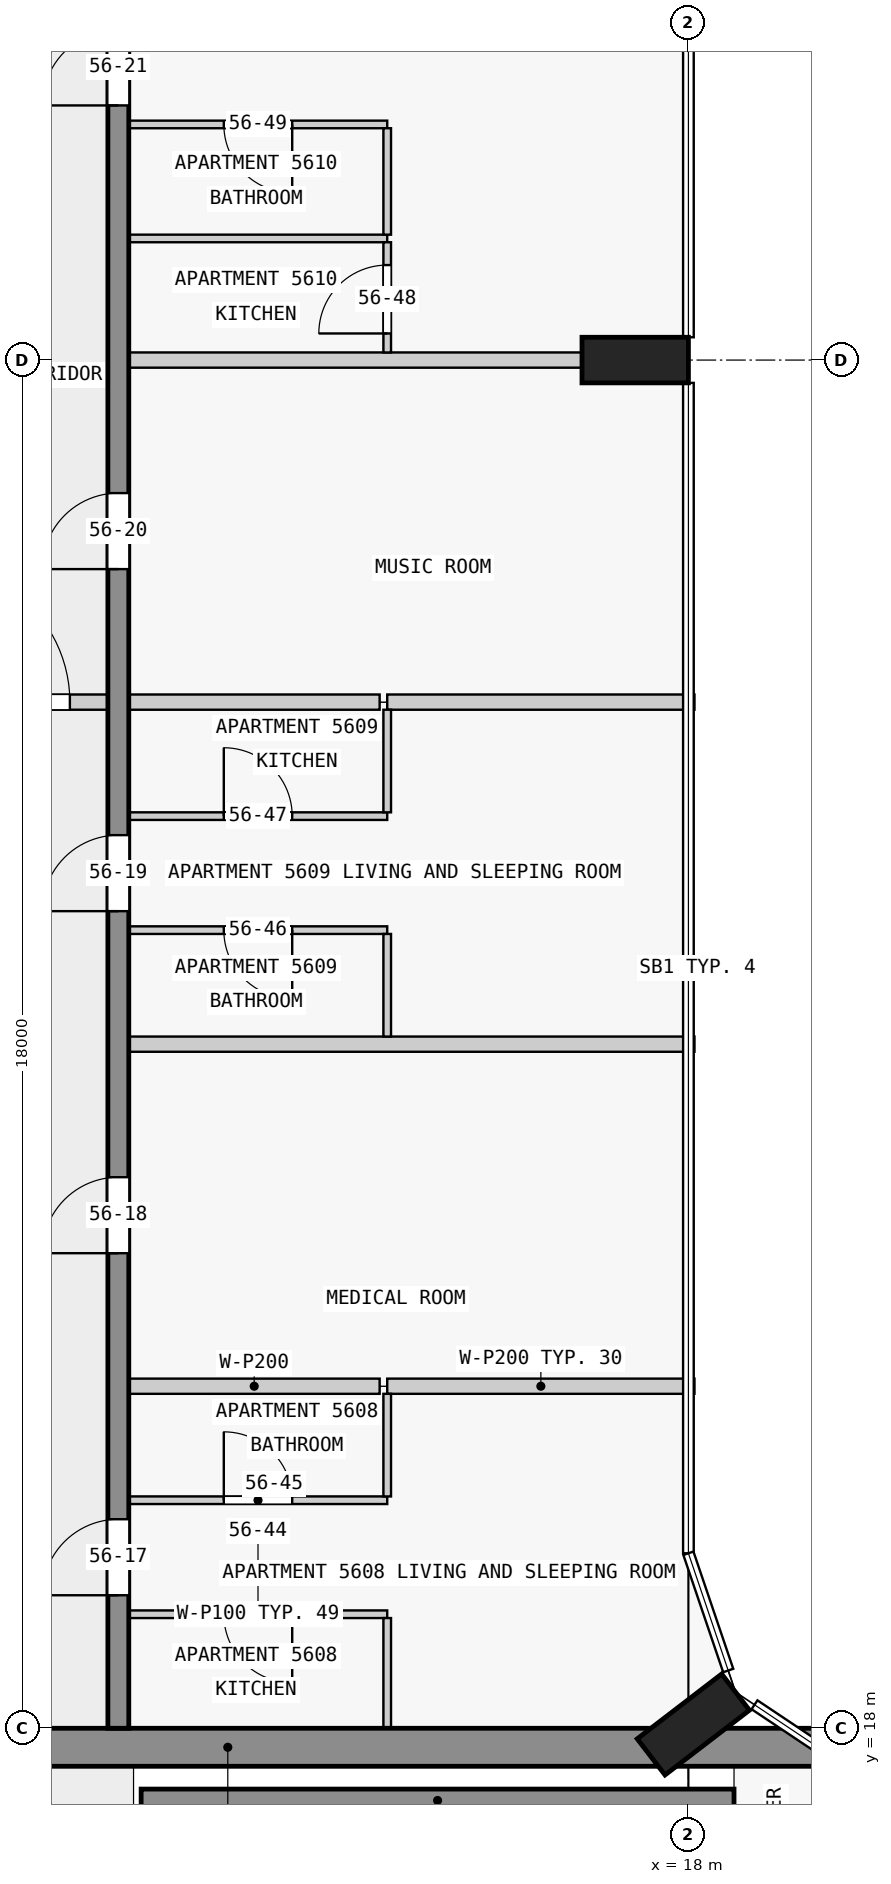
"""IFC4 building model, lengths in metres.
Left out: names, types, materials, properties, quantities, classifications, styles, units other than length and angle.
Written with IfcOpenShell. Run it as: python <this file> out.ifc"""

import sys

from ifc_helpers import new_model, si_unit, direction, frame, frame_2d, origin, origin_2d, place, context, subcontext, project, spatial, rectangle, extrude, element, fill, save


model = new_model("IFC4")
c1 = context("Model", 3, precision=1e-05, world=origin(), true_north=direction((0.0, 1.0)))
c2 = subcontext(c1, "Body", "Model", "MODEL_VIEW")
j1 = project(units=[si_unit("LENGTHUNIT", "METRE"), si_unit("PLANEANGLEUNIT", "RADIAN")], contexts=[c1])
p1 = place(None, origin())
s1 = spatial("IfcSite", under=j1, at=p1, CompositionType="ELEMENT")
p2 = place(p1, origin())
s2 = spatial("IfcBuilding", under=s1, at=p2, CompositionType="ELEMENT")
p3 = place(p2, frame((0.0, 0.0, 215.4)))
s3 = spatial("IfcBuildingStorey", under=s2, at=p3, CompositionType="ELEMENT", Elevation=215.4)
for number, where, z_axis, x_axis in (
    (1, (18.065, 18.05, 0.0), (0.0, 0.0, 1.0), (-0.609, 0.793, 0.0)),
    (2, (17.3, 36.0, 0.0), (0.0, 0.0, 1.0), (0.0, 1.0, 0.0)),
):
    element("IfcColumn", number, at=place(p3, frame(where, z_axis=z_axis, x_axis=x_axis)), inside=s3, PredefinedType="COLUMN", context=c2, shape_type="SweptSolid", body=[
        extrude(rectangle(XDim=0.6, YDim=1.4, at=origin_2d()), origin(), (0.0, 0.0, 1.0), 3.5),
    ])
p4 = place(p3, frame((1.38, 17.75, 0.0), z_axis=(0.0, 0.0, 1.0), x_axis=(1.0, 0.0, 0.0)))
e3 = element("IfcWall", 3, at=p4, inside=s3, PredefinedType="SHEAR", context=c2, shape_type="SweptSolid", body=[
    extrude(rectangle(XDim=21.12, YDim=0.5, at=frame_2d((10.56, 0.0))), origin(), (0.0, 0.0, 1.0), 3.25),
])
p5 = place(p4, frame((6.3, 0.0, 0.0)))
e4 = element("IfcOpeningElement", 4, at=p5, cuts=e3, PredefinedType="OPENING", context=c2, shape_type="SweptSolid", body=[
    extrude(rectangle(XDim=1.8, YDim=2.1, at=frame_2d((0.9, 1.05))), frame((0.0, 0.26, 0.0), z_axis=(0.0, -1.0, 0.0), x_axis=(1.0, 0.0, 0.0)), (0.0, 0.0, 1.0), 0.52),
])
p6 = place(p3, frame((10.8, 17.05, 0.0), z_axis=(0.0, 0.0, 1.0), x_axis=(1.0, 0.0, 0.0)))
e5 = element("IfcWall", 5, at=p6, inside=s3, PredefinedType="SHEAR", context=c2, shape_type="SweptSolid", body=[
    extrude(rectangle(XDim=7.8, YDim=0.3, at=frame_2d((3.9, 0.0))), origin(), (0.0, 0.0, 1.0), 3.25),
])
p7 = place(p3, frame((10.5, 18.0, 0.0), z_axis=(0.0, 0.0, 1.0), x_axis=(0.0, 1.0, 0.0)))
e6 = element("IfcWall", 6, at=p7, inside=s3, PredefinedType="SHEAR", context=c2, shape_type="SweptSolid", body=[
    extrude(rectangle(XDim=27.0, YDim=0.275, at=frame_2d((13.5, 0.0))), origin(), (0.0, 0.0, 1.0), 3.25),
])
p8 = place(p7, frame((1.75, 0.0, 0.0)))
e7 = element("IfcOpeningElement", 7, at=p8, cuts=e6, PredefinedType="OPENING", context=c2, shape_type="SweptSolid", body=[
    extrude(rectangle(XDim=1.0, YDim=2.1, at=frame_2d((0.5, 1.05))), frame((0.0, 0.147, 0.0), z_axis=(0.0, -1.0, 0.0), x_axis=(1.0, 0.0, 0.0)), (0.0, 0.0, 1.0), 0.295),
])
p9 = place(p7, frame((6.25, 0.0, 0.0)))
e8 = element("IfcOpeningElement", 8, at=p9, cuts=e6, PredefinedType="OPENING", context=c2, shape_type="SweptSolid", body=[
    extrude(rectangle(XDim=1.0, YDim=2.1, at=frame_2d((0.5, 1.05))), frame((0.0, 0.147, 0.0), z_axis=(0.0, -1.0, 0.0), x_axis=(1.0, 0.0, 0.0)), (0.0, 0.0, 1.0), 0.295),
])
p10 = place(p7, frame((10.75, 0.0, 0.0)))
e9 = element("IfcOpeningElement", 9, at=p10, cuts=e6, PredefinedType="OPENING", context=c2, shape_type="SweptSolid", body=[
    extrude(rectangle(XDim=1.0, YDim=2.1, at=frame_2d((0.5, 1.05))), frame((0.0, 0.147, 0.0), z_axis=(0.0, -1.0, 0.0), x_axis=(1.0, 0.0, 0.0)), (0.0, 0.0, 1.0), 0.295),
])
p11 = place(p7, frame((15.25, 0.0, 0.0)))
e10 = element("IfcOpeningElement", 10, at=p11, cuts=e6, PredefinedType="OPENING", context=c2, shape_type="SweptSolid", body=[
    extrude(rectangle(XDim=1.0, YDim=2.1, at=frame_2d((0.5, 1.05))), frame((0.0, 0.147, 0.0), z_axis=(0.0, -1.0, 0.0), x_axis=(1.0, 0.0, 0.0)), (0.0, 0.0, 1.0), 0.295),
])
p12 = place(p7, frame((21.35, 0.0, 0.0)))
e11 = element("IfcOpeningElement", 11, at=p12, cuts=e6, PredefinedType="OPENING", context=c2, shape_type="SweptSolid", body=[
    extrude(rectangle(XDim=1.0, YDim=2.1, at=frame_2d((0.5, 1.05))), frame((0.0, 0.147, 0.0), z_axis=(0.0, -1.0, 0.0), x_axis=(1.0, 0.0, 0.0)), (0.0, 0.0, 1.0), 0.295),
])
p13 = place(p3, frame((14.038, 19.5, 0.0), z_axis=(0.0, 0.0, 1.0), x_axis=(-1.0, 0.0, 0.0)))
e12 = element("IfcWall", 12, at=p13, inside=s3, PredefinedType="PARTITIONING", context=c2, shape_type="SweptSolid", body=[
    extrude(rectangle(XDim=3.4, YDim=0.1, at=frame_2d((1.7, 0.0))), origin(), (0.0, 0.0, 1.0), 3.25),
])
p14 = place(p13, frame((1.25, 0.0, 0.0)))
e13 = element("IfcOpeningElement", 13, at=p14, cuts=e12, PredefinedType="OPENING", context=c2, shape_type="SweptSolid", body=[
    extrude(rectangle(XDim=0.9, YDim=2.1, at=frame_2d((0.45, 1.05))), frame((0.0, 0.06, 0.0), z_axis=(0.0, -1.0, 0.0), x_axis=(1.0, 0.0, 0.0)), (0.0, 0.0, 1.0), 0.12),
])
p15 = place(p3, frame((10.637, 21.0, 0.0), z_axis=(0.0, 0.0, 1.0), x_axis=(1.0, 0.0, 0.0)))
e14 = element("IfcWall", 14, at=p15, inside=s3, PredefinedType="PARTITIONING", context=c2, shape_type="SweptSolid", body=[
    extrude(rectangle(XDim=3.4, YDim=0.1, at=frame_2d((1.7, 0.0))), origin(), (0.0, 0.0, 1.0), 3.25),
])
p16 = place(p15, frame((1.25, 0.0, 0.0)))
e15 = element("IfcOpeningElement", 15, at=p16, cuts=e14, PredefinedType="OPENING", context=c2, shape_type="SweptSolid", body=[
    extrude(rectangle(XDim=0.9, YDim=2.1, at=frame_2d((0.45, 1.05))), frame((0.0, 0.06, 0.0), z_axis=(0.0, -1.0, 0.0), x_axis=(1.0, 0.0, 0.0)), (0.0, 0.0, 1.0), 0.12),
])
p17 = place(p3, frame((13.938, 22.5, 0.0), z_axis=(0.0, 0.0, 1.0), x_axis=(-1.0, 0.0, 0.0)))
e16 = element("IfcWall", 16, at=p17, inside=s3, PredefinedType="PARTITIONING", context=c2, shape_type="SweptSolid", body=[
    extrude(rectangle(XDim=3.3, YDim=0.2, at=frame_2d((1.65, 0.0))), origin(), (0.0, 0.0, 1.0), 3.25),
])
p18 = place(p3, frame((14.038, 22.5, 0.0), z_axis=(0.0, 0.0, 1.0), x_axis=(1.0, 0.0, 0.0)))
e17 = element("IfcWall", 17, at=p18, inside=s3, PredefinedType="PARTITIONING", context=c2, shape_type="SweptSolid", body=[
    extrude(rectangle(XDim=4.042, YDim=0.2, at=frame_2d((2.021, 0.0))), origin(), (0.0, 0.0, 1.0), 3.25),
])
p19 = place(p3, frame((18.08, 27.0, 0.0), z_axis=(0.0, 0.0, 1.0), x_axis=(-1.0, 0.0, 0.0)))
e18 = element("IfcWall", 18, at=p19, inside=s3, PredefinedType="PARTITIONING", context=c2, shape_type="SweptSolid", body=[
    extrude(rectangle(XDim=7.443, YDim=0.2, at=frame_2d((3.721, 0.0))), origin(), (0.0, 0.0, 1.0), 3.25),
])
p20 = place(p3, frame((14.038, 28.5, 0.0), z_axis=(0.0, 0.0, 1.0), x_axis=(-1.0, 0.0, 0.0)))
e19 = element("IfcWall", 19, at=p20, inside=s3, PredefinedType="PARTITIONING", context=c2, shape_type="SweptSolid", body=[
    extrude(rectangle(XDim=3.4, YDim=0.1, at=frame_2d((1.7, 0.0))), origin(), (0.0, 0.0, 1.0), 3.25),
])
p21 = place(p20, frame((1.25, 0.0, 0.0)))
e20 = element("IfcOpeningElement", 20, at=p21, cuts=e19, PredefinedType="OPENING", context=c2, shape_type="SweptSolid", body=[
    extrude(rectangle(XDim=0.9, YDim=2.1, at=frame_2d((0.45, 1.05))), frame((0.0, 0.06, 0.0), z_axis=(0.0, -1.0, 0.0), x_axis=(1.0, 0.0, 0.0)), (0.0, 0.0, 1.0), 0.12),
])
p22 = place(p3, frame((10.637, 30.0, 0.0), z_axis=(0.0, 0.0, 1.0), x_axis=(1.0, 0.0, 0.0)))
e21 = element("IfcWall", 21, at=p22, inside=s3, PredefinedType="PARTITIONING", context=c2, shape_type="SweptSolid", body=[
    extrude(rectangle(XDim=3.4, YDim=0.1, at=frame_2d((1.7, 0.0))), origin(), (0.0, 0.0, 1.0), 3.25),
])
p23 = place(p22, frame((1.25, 0.0, 0.0)))
e22 = element("IfcOpeningElement", 22, at=p23, cuts=e21, PredefinedType="OPENING", context=c2, shape_type="SweptSolid", body=[
    extrude(rectangle(XDim=0.9, YDim=2.1, at=frame_2d((0.45, 1.05))), frame((0.0, 0.06, 0.0), z_axis=(0.0, -1.0, 0.0), x_axis=(1.0, 0.0, 0.0)), (0.0, 0.0, 1.0), 0.12),
])
p24 = place(p3, frame((13.938, 31.5, 0.0), z_axis=(0.0, 0.0, 1.0), x_axis=(-1.0, 0.0, 0.0)))
e23 = element("IfcWall", 23, at=p24, inside=s3, PredefinedType="PARTITIONING", context=c2, shape_type="SweptSolid", body=[
    extrude(rectangle(XDim=3.3, YDim=0.2, at=frame_2d((1.65, 0.0))), origin(), (0.0, 0.0, 1.0), 3.25),
])
p25 = place(p3, frame((14.038, 31.5, 0.0), z_axis=(0.0, 0.0, 1.0), x_axis=(1.0, 0.0, 0.0)))
e24 = element("IfcWall", 24, at=p25, inside=s3, PredefinedType="PARTITIONING", context=c2, shape_type="SweptSolid", body=[
    extrude(rectangle(XDim=4.042, YDim=0.2, at=frame_2d((2.021, 0.0))), origin(), (0.0, 0.0, 1.0), 3.25),
])
p26 = place(p3, frame((16.6, 36.0, 0.0), z_axis=(0.0, 0.0, 1.0), x_axis=(-1.0, 0.0, 0.0)))
e25 = element("IfcWall", 25, at=p26, inside=s3, PredefinedType="PARTITIONING", context=c2, shape_type="SweptSolid", body=[
    extrude(rectangle(XDim=5.963, YDim=0.2, at=frame_2d((2.981, 0.0))), origin(), (0.0, 0.0, 1.0), 3.25),
])
p27 = place(p3, frame((14.038, 37.6, 0.0), z_axis=(0.0, 0.0, 1.0), x_axis=(-1.0, 0.0, 0.0)))
e26 = element("IfcWall", 26, at=p27, inside=s3, PredefinedType="PARTITIONING", context=c2, shape_type="SweptSolid", body=[
    extrude(rectangle(XDim=3.4, YDim=0.1, at=frame_2d((1.7, 0.0))), origin(), (0.0, 0.0, 1.0), 3.25),
])
p28 = place(p3, frame((14.038, 39.1, 0.0), z_axis=(0.0, 0.0, 1.0), x_axis=(-1.0, 0.0, 0.0)))
e27 = element("IfcWall", 27, at=p28, inside=s3, PredefinedType="PARTITIONING", context=c2, shape_type="SweptSolid", body=[
    extrude(rectangle(XDim=3.4, YDim=0.1, at=frame_2d((1.7, 0.0))), origin(), (0.0, 0.0, 1.0), 3.25),
])
p29 = place(p28, frame((1.25, 0.0, 0.0)))
e28 = element("IfcOpeningElement", 28, at=p29, cuts=e27, PredefinedType="OPENING", context=c2, shape_type="SweptSolid", body=[
    extrude(rectangle(XDim=0.9, YDim=2.1, at=frame_2d((0.45, 1.05))), frame((0.0, 0.06, 0.0), z_axis=(0.0, -1.0, 0.0), x_axis=(1.0, 0.0, 0.0)), (0.0, 0.0, 1.0), 0.12),
])
p30 = place(p3, frame((14.038, 18.0, 0.0), z_axis=(0.0, 0.0, 1.0), x_axis=(0.0, 1.0, 0.0)))
e29 = element("IfcWall", 29, at=p30, inside=s3, PredefinedType="PARTITIONING", context=c2, shape_type="SweptSolid", body=[
    extrude(rectangle(XDim=1.45, YDim=0.1, at=frame_2d((0.725, 0.0))), origin(), (0.0, 0.0, 1.0), 3.25),
])
for number, where, z_axis, x_axis in (
    (30, (14.038, 21.05, 0.0), (0.0, 0.0, 1.0), (0.0, 1.0, 0.0)),
    (31, (14.038, 27.1, 0.0), (0.0, 0.0, 1.0), (0.0, 1.0, 0.0)),
    (32, (14.038, 30.05, 0.0), (0.0, 0.0, 1.0), (0.0, 1.0, 0.0)),
):
    element("IfcWall", number, at=place(p3, frame(where, z_axis=z_axis, x_axis=x_axis)), inside=s3, PredefinedType="PARTITIONING", context=c2, shape_type="SweptSolid", body=[
        extrude(rectangle(XDim=1.35, YDim=0.1, at=frame_2d((0.675, 0.0))), origin(), (0.0, 0.0, 1.0), 3.25),
    ])
p31 = place(p3, frame((14.038, 36.1, 0.0), z_axis=(0.0, 0.0, 1.0), x_axis=(0.0, 1.0, 0.0)))
e33 = element("IfcWall", 33, at=p31, inside=s3, PredefinedType="PARTITIONING", context=c2, shape_type="SweptSolid", body=[
    extrude(rectangle(XDim=1.45, YDim=0.1, at=frame_2d((0.725, 0.0))), origin(), (0.0, 0.0, 1.0), 3.25),
])
p32 = place(p31, frame((0.25, 0.0, 0.0)))
e34 = element("IfcOpeningElement", 34, at=p32, cuts=e33, PredefinedType="OPENING", context=c2, shape_type="SweptSolid", body=[
    extrude(rectangle(XDim=0.9, YDim=2.1, at=frame_2d((0.45, 1.05))), frame((0.0, 0.06, 0.0), z_axis=(0.0, -1.0, 0.0), x_axis=(1.0, 0.0, 0.0)), (0.0, 0.0, 1.0), 0.12),
])
p33 = place(p3, frame((14.038, 37.65, 0.0), z_axis=(0.0, 0.0, 1.0), x_axis=(0.0, 1.0, 0.0)))
e35 = element("IfcWall", 35, at=p33, inside=s3, PredefinedType="PARTITIONING", context=c2, shape_type="SweptSolid", body=[
    extrude(rectangle(XDim=1.4, YDim=0.1, at=frame_2d((0.7, 0.0))), origin(), (0.0, 0.0, 1.0), 3.25),
])
p34 = place(p3, frame((7.462, 31.5, 0.0), z_axis=(0.0, 0.0, 1.0), x_axis=(1.0, 0.0, 0.0)))
e36 = element("IfcWall", 36, at=p34, inside=s3, PredefinedType="PARTITIONING", context=c2, shape_type="SweptSolid", body=[
    extrude(rectangle(XDim=3.075, YDim=0.2, at=frame_2d((1.538, 0.0))), origin(), (0.0, 0.0, 1.0), 3.25),
])
p35 = place(p34, frame((0.6, 0.0, 0.0)))
e37 = element("IfcOpeningElement", 37, at=p35, cuts=e36, PredefinedType="OPENING", context=c2, shape_type="SweptSolid", body=[
    extrude(rectangle(XDim=1.8, YDim=2.1, at=frame_2d((0.9, 1.05))), frame((0.0, 0.11, 0.0), z_axis=(0.0, -1.0, 0.0), x_axis=(1.0, 0.0, 0.0)), (0.0, 0.0, 1.0), 0.22),
])
p36 = place(p8, origin())
e38 = element("IfcDoor", 38, at=p36, inside=s3, OperationType="SINGLE_SWING_LEFT", PredefinedType="DOOR", context=c2, shape_type="SweptSolid", body=[
    extrude(rectangle(XDim=1.0, YDim=2.1, at=frame_2d((0.5, 1.05))), frame((0.0, 0.025, 0.0), z_axis=(0.0, -1.0, 0.0), x_axis=(1.0, 0.0, 0.0)), (0.0, 0.0, 1.0), 0.05),
])
fill(e7, e38)
p37 = place(p9, origin())
e39 = element("IfcDoor", 39, at=p37, inside=s3, OperationType="SINGLE_SWING_LEFT", PredefinedType="DOOR", context=c2, shape_type="SweptSolid", body=[
    extrude(rectangle(XDim=1.0, YDim=2.1, at=frame_2d((0.5, 1.05))), frame((0.0, 0.025, 0.0), z_axis=(0.0, -1.0, 0.0), x_axis=(1.0, 0.0, 0.0)), (0.0, 0.0, 1.0), 0.05),
])
fill(e8, e39)
p38 = place(p10, origin())
e40 = element("IfcDoor", 40, at=p38, inside=s3, OperationType="SINGLE_SWING_LEFT", PredefinedType="DOOR", context=c2, shape_type="SweptSolid", body=[
    extrude(rectangle(XDim=1.0, YDim=2.1, at=frame_2d((0.5, 1.05))), frame((0.0, 0.025, 0.0), z_axis=(0.0, -1.0, 0.0), x_axis=(1.0, 0.0, 0.0)), (0.0, 0.0, 1.0), 0.05),
])
fill(e9, e40)
p39 = place(p11, origin())
e41 = element("IfcDoor", 41, at=p39, inside=s3, OperationType="SINGLE_SWING_RIGHT", PredefinedType="DOOR", context=c2, shape_type="SweptSolid", body=[
    extrude(rectangle(XDim=1.0, YDim=2.1, at=frame_2d((0.5, 1.05))), frame((0.0, 0.025, 0.0), z_axis=(0.0, -1.0, 0.0), x_axis=(1.0, 0.0, 0.0)), (0.0, 0.0, 1.0), 0.05),
])
fill(e10, e41)
p40 = place(p12, origin())
e42 = element("IfcDoor", 42, at=p40, inside=s3, OperationType="SINGLE_SWING_RIGHT", PredefinedType="DOOR", context=c2, shape_type="SweptSolid", body=[
    extrude(rectangle(XDim=1.0, YDim=2.1, at=frame_2d((0.5, 1.05))), frame((0.0, 0.025, 0.0), z_axis=(0.0, -1.0, 0.0), x_axis=(1.0, 0.0, 0.0)), (0.0, 0.0, 1.0), 0.05),
])
fill(e11, e42)
p41 = place(p35, origin())
e43 = element("IfcDoor", 43, at=p41, inside=s3, OperationType="SINGLE_SWING_LEFT", PredefinedType="DOOR", context=c2, shape_type="SweptSolid", body=[
    extrude(rectangle(XDim=1.8, YDim=2.1, at=frame_2d((0.9, 1.05))), frame((0.0, 0.025, 0.0), z_axis=(0.0, -1.0, 0.0), x_axis=(1.0, 0.0, 0.0)), (0.0, 0.0, 1.0), 0.05),
])
fill(e37, e43)
p42 = place(p14, origin())
e44 = element("IfcDoor", 44, at=p42, inside=s3, OperationType="SINGLE_SWING_LEFT", PredefinedType="DOOR", context=c2, shape_type="SweptSolid", body=[
    extrude(rectangle(XDim=0.9, YDim=2.1, at=frame_2d((0.45, 1.05))), frame((0.0, 0.025, 0.0), z_axis=(0.0, -1.0, 0.0), x_axis=(1.0, 0.0, 0.0)), (0.0, 0.0, 1.0), 0.05),
])
fill(e13, e44)
p43 = place(p16, origin())
e45 = element("IfcDoor", 45, at=p43, inside=s3, OperationType="SINGLE_SWING_LEFT", PredefinedType="DOOR", context=c2, shape_type="SweptSolid", body=[
    extrude(rectangle(XDim=0.9, YDim=2.1, at=frame_2d((0.45, 1.05))), frame((0.0, 0.025, 0.0), z_axis=(0.0, -1.0, 0.0), x_axis=(1.0, 0.0, 0.0)), (0.0, 0.0, 1.0), 0.05),
])
fill(e15, e45)
p44 = place(p21, origin())
e46 = element("IfcDoor", 46, at=p44, inside=s3, OperationType="SINGLE_SWING_LEFT", PredefinedType="DOOR", context=c2, shape_type="SweptSolid", body=[
    extrude(rectangle(XDim=0.9, YDim=2.1, at=frame_2d((0.45, 1.05))), frame((0.0, 0.025, 0.0), z_axis=(0.0, -1.0, 0.0), x_axis=(1.0, 0.0, 0.0)), (0.0, 0.0, 1.0), 0.05),
])
fill(e20, e46)
p45 = place(p23, origin())
e47 = element("IfcDoor", 47, at=p45, inside=s3, OperationType="SINGLE_SWING_LEFT", PredefinedType="DOOR", context=c2, shape_type="SweptSolid", body=[
    extrude(rectangle(XDim=0.9, YDim=2.1, at=frame_2d((0.45, 1.05))), frame((0.0, 0.025, 0.0), z_axis=(0.0, -1.0, 0.0), x_axis=(1.0, 0.0, 0.0)), (0.0, 0.0, 1.0), 0.05),
])
fill(e22, e47)
p46 = place(p32, origin())
e48 = element("IfcDoor", 48, at=p46, inside=s3, OperationType="SINGLE_SWING_LEFT", PredefinedType="DOOR", context=c2, shape_type="SweptSolid", body=[
    extrude(rectangle(XDim=0.9, YDim=2.1, at=frame_2d((0.45, 1.05))), frame((0.0, 0.025, 0.0), z_axis=(0.0, -1.0, 0.0), x_axis=(1.0, 0.0, 0.0)), (0.0, 0.0, 1.0), 0.05),
])
fill(e34, e48)
p47 = place(p29, origin())
e49 = element("IfcDoor", 49, at=p47, inside=s3, OperationType="SINGLE_SWING_LEFT", PredefinedType="DOOR", context=c2, shape_type="SweptSolid", body=[
    extrude(rectangle(XDim=0.9, YDim=2.1, at=frame_2d((0.45, 1.05))), frame((0.0, 0.025, 0.0), z_axis=(0.0, -1.0, 0.0), x_axis=(1.0, 0.0, 0.0)), (0.0, 0.0, 1.0), 0.05),
])
fill(e28, e49)
save(model, sys.argv[1])
